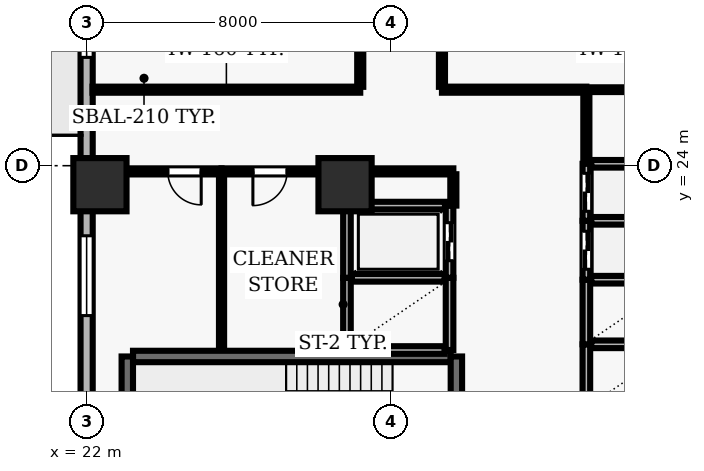
"""IFC4 building model, lengths in metres.
Left out: names, types, materials, properties, quantities, classifications, styles, units other than length and angle.
Written with IfcOpenShell. Run it as: python <this file> out.ifc"""

import sys

from ifc_helpers import new_model, si_unit, direction, frame, frame_2d, origin, origin_2d, place, context, subcontext, project, spatial, rectangle, extrude, element, fill, save


model = new_model("IFC4")
c1 = context("Model", 3, precision=1e-05, world=origin(), true_north=direction((0.0, 1.0)))
c2 = subcontext(c1, "Body", "Model", "MODEL_VIEW")
j1 = project(units=[si_unit("LENGTHUNIT", "METRE"), si_unit("PLANEANGLEUNIT", "RADIAN")], contexts=[c1])
p1 = place(None, origin())
s1 = spatial("IfcSite", under=j1, at=p1, CompositionType="ELEMENT")
p2 = place(p1, origin())
s2 = spatial("IfcBuilding", under=s1, at=p2, CompositionType="ELEMENT")
p3 = place(p2, frame((0.0, 0.0, 66.1)))
s3 = spatial("IfcBuildingStorey", under=s2, at=p3, CompositionType="ELEMENT", Elevation=66.1)
for number, where, z_axis, x_axis in (
    (1, (22.35, 23.5, 0.0), (0.0, 0.0, 1.0), (1.0, 0.0, 0.0)),
    (2, (28.8, 23.5, 0.0), (0.0, 0.0, 1.0), (1.0, 0.0, 0.0)),
):
    element("IfcColumn", number, at=place(p3, frame(where, z_axis=z_axis, x_axis=x_axis)), inside=s3, PredefinedType="COLUMN", context=c2, shape_type="SweptSolid", body=[
        extrude(rectangle(XDim=1.4, YDim=1.4, at=origin_2d()), origin(), (0.0, 0.0, 1.0), 3.9),
    ])
p4 = place(p3, frame((22.0, 51.5, 0.0), z_axis=(0.0, 0.0, 1.0), x_axis=(0.0, -1.0, 0.0)))
e3 = element("IfcWall", 3, at=p4, inside=s3, PredefinedType="SOLIDWALL", context=c2, shape_type="SweptSolid", body=[
    extrude(rectangle(XDim=49.0, YDim=0.32, at=frame_2d((24.5, 0.0))), origin(), (0.0, 0.0, 1.0), 3.69),
])
p5 = place(p4, frame((12.1, 0.0, 0.0)))
e4 = element("IfcOpeningElement", 4, at=p5, cuts=e3, PredefinedType="OPENING", context=c2, shape_type="SweptSolid", body=[
    extrude(rectangle(XDim=1.0, YDim=2.2, at=frame_2d((0.5, 1.1))), frame((0.0, 0.17, 0.0), z_axis=(0.0, -1.0, 0.0), x_axis=(1.0, 0.0, 0.0)), (0.0, 0.0, 1.0), 0.34),
])
p6 = place(p4, frame((1.672, 0.0, 0.9)))
e5 = element("IfcOpeningElement", 5, at=p6, cuts=e3, PredefinedType="OPENING", context=c2, shape_type="SweptSolid", body=[
    extrude(rectangle(XDim=2.1, YDim=1.6, at=frame_2d((1.05, 0.8))), frame((0.0, 0.17, 0.0), z_axis=(0.0, -1.0, 0.0), x_axis=(1.0, 0.0, 0.0)), (0.0, 0.0, 1.0), 0.34),
])
p7 = place(p4, frame((7.117, 0.0, 0.9)))
e6 = element("IfcOpeningElement", 6, at=p7, cuts=e3, PredefinedType="OPENING", context=c2, shape_type="SweptSolid", body=[
    extrude(rectangle(XDim=2.1, YDim=1.6, at=frame_2d((1.05, 0.8))), frame((0.0, 0.17, 0.0), z_axis=(0.0, -1.0, 0.0), x_axis=(1.0, 0.0, 0.0)), (0.0, 0.0, 1.0), 0.34),
])
p8 = place(p4, frame((18.006, 0.0, 0.9)))
e7 = element("IfcOpeningElement", 7, at=p8, cuts=e3, PredefinedType="OPENING", context=c2, shape_type="SweptSolid", body=[
    extrude(rectangle(XDim=2.1, YDim=1.6, at=frame_2d((1.05, 0.8))), frame((0.0, 0.17, 0.0), z_axis=(0.0, -1.0, 0.0), x_axis=(1.0, 0.0, 0.0)), (0.0, 0.0, 1.0), 0.34),
])
p9 = place(p4, frame((22.55, 0.0, 0.9)))
e8 = element("IfcOpeningElement", 8, at=p9, cuts=e3, PredefinedType="OPENING", context=c2, shape_type="SweptSolid", body=[
    extrude(rectangle(XDim=2.1, YDim=1.6, at=frame_2d((1.05, 0.8))), frame((0.0, 0.17, 0.0), z_axis=(0.0, -1.0, 0.0), x_axis=(1.0, 0.0, 0.0)), (0.0, 0.0, 1.0), 0.34),
])
p10 = place(p4, frame((29.344, 0.0, 0.9)))
e9 = element("IfcOpeningElement", 9, at=p10, cuts=e3, PredefinedType="OPENING", context=c2, shape_type="SweptSolid", body=[
    extrude(rectangle(XDim=2.1, YDim=1.6, at=frame_2d((1.05, 0.8))), frame((0.0, 0.17, 0.0), z_axis=(0.0, -1.0, 0.0), x_axis=(1.0, 0.0, 0.0)), (0.0, 0.0, 1.0), 0.34),
])
p11 = place(p4, frame((33.889, 0.0, 0.9)))
e10 = element("IfcOpeningElement", 10, at=p11, cuts=e3, PredefinedType="OPENING", context=c2, shape_type="SweptSolid", body=[
    extrude(rectangle(XDim=2.1, YDim=1.6, at=frame_2d((1.05, 0.8))), frame((0.0, 0.17, 0.0), z_axis=(0.0, -1.0, 0.0), x_axis=(1.0, 0.0, 0.0)), (0.0, 0.0, 1.0), 0.34),
])
p12 = place(p4, frame((39.783, 0.0, 0.9)))
e11 = element("IfcOpeningElement", 11, at=p12, cuts=e3, PredefinedType="OPENING", context=c2, shape_type="SweptSolid", body=[
    extrude(rectangle(XDim=2.1, YDim=1.6, at=frame_2d((1.05, 0.8))), frame((0.0, 0.17, 0.0), z_axis=(0.0, -1.0, 0.0), x_axis=(1.0, 0.0, 0.0)), (0.0, 0.0, 1.0), 0.34),
])
p13 = place(p3, frame((31.58, 18.98, 0.0), z_axis=(0.0, 0.0, 1.0), x_axis=(-1.0, 0.0, 0.0)))
e12 = element("IfcWall", 12, at=p13, inside=s3, PredefinedType="SHEAR", context=c2, shape_type="SweptSolid", body=[
    extrude(rectangle(XDim=8.36, YDim=0.3, at=frame_2d((4.18, 0.0))), origin(), (0.0, 0.0, 1.0), 3.69),
])
p14 = place(p3, frame((23.07, 18.98, 0.0), z_axis=(0.0, 0.0, 1.0), x_axis=(0.0, -1.0, 0.0)))
e13 = element("IfcWall", 13, at=p14, inside=s3, PredefinedType="SHEAR", context=c2, shape_type="SweptSolid", body=[
    extrude(rectangle(XDim=3.51, YDim=0.3, at=frame_2d((1.755, 0.0))), origin(), (0.0, 0.0, 1.0), 3.69),
])
p15 = place(p3, frame((31.73, 15.47, 0.0), z_axis=(0.0, 0.0, 1.0), x_axis=(0.0, 1.0, 0.0)))
e14 = element("IfcWall", 14, at=p15, inside=s3, PredefinedType="SHEAR", context=c2, shape_type="SweptSolid", body=[
    extrude(rectangle(XDim=3.51, YDim=0.3, at=frame_2d((1.755, 0.0))), origin(), (0.0, 0.0, 1.0), 3.69),
])
p16 = place(p15, frame((1.18, 0.0, 0.0)))
e15 = element("IfcOpeningElement", 15, at=p16, cuts=e14, PredefinedType="OPENING", context=c2, shape_type="SweptSolid", body=[
    extrude(rectangle(XDim=1.15, YDim=2.15, at=frame_2d((0.575, 1.075))), frame((0.0, 0.16, 0.0), z_axis=(0.0, -1.0, 0.0), x_axis=(1.0, 0.0, 0.0)), (0.0, 0.0, 1.0), 0.32),
])
p17 = place(p3, frame((35.15, 19.3, 0.0), z_axis=(0.0, 0.0, 1.0), x_axis=(0.0, -1.0, 0.0)))
e16 = element("IfcWall", 16, at=p17, inside=s3, PredefinedType="SOLIDWALL", context=c2, shape_type="SweptSolid", body=[
    extrude(rectangle(XDim=1.7, YDim=0.2, at=frame_2d((0.85, 0.0))), origin(), (0.0, 0.0, 1.0), 3.69),
])
p18 = place(p3, frame((37.42, 19.3, 0.0), z_axis=(0.0, 0.0, 1.0), x_axis=(-1.0, 0.0, 0.0)))
e17 = element("IfcWall", 17, at=p18, inside=s3, PredefinedType="SOLIDWALL", context=c2, shape_type="SweptSolid", body=[
    extrude(rectangle(XDim=2.14, YDim=0.2, at=frame_2d((1.07, 0.0))), origin(), (0.0, 0.0, 1.0), 3.69),
])
p19 = place(p3, frame((35.15, 21.0, 0.0), z_axis=(0.0, 0.0, 1.0), x_axis=(0.0, -1.0, 0.0)))
e18 = element("IfcWall", 18, at=p19, inside=s3, PredefinedType="SOLIDWALL", context=c2, shape_type="SweptSolid", body=[
    extrude(rectangle(XDim=1.7, YDim=0.2, at=frame_2d((0.85, 0.0))), origin(), (0.0, 0.0, 1.0), 3.69),
])
p20 = place(p3, frame((37.42, 21.0, 0.0), z_axis=(0.0, 0.0, 1.0), x_axis=(-1.0, 0.0, 0.0)))
e19 = element("IfcWall", 19, at=p20, inside=s3, PredefinedType="SOLIDWALL", context=c2, shape_type="SweptSolid", body=[
    extrude(rectangle(XDim=2.14, YDim=0.2, at=frame_2d((1.07, 0.0))), origin(), (0.0, 0.0, 1.0), 3.69),
])
for number, where, z_axis, x_axis in (
    (20, (28.85, 21.05, 0.0), (0.0, 0.0, 1.0), (0.0, -1.0, 0.0)),
    (21, (31.55, 19.15, 0.0), (0.0, 0.0, 1.0), (0.0, 1.0, 0.0)),
):
    element("IfcWall", number, at=place(p3, frame(where, z_axis=z_axis, x_axis=x_axis)), inside=s3, PredefinedType="SOLIDWALL", context=c2, shape_type="SweptSolid", body=[
        extrude(rectangle(XDim=1.9, YDim=0.2, at=frame_2d((0.95, 0.0))), origin(), (0.0, 0.0, 1.0), 3.69),
    ])
for number, where, z_axis, x_axis in (
    (22, (28.98, 19.15, 0.0), (0.0, 0.0, 1.0), (1.0, 0.0, 0.0)),
    (23, (31.42, 21.05, 0.0), (0.0, 0.0, 1.0), (-1.0, 0.0, 0.0)),
):
    element("IfcWall", number, at=place(p3, frame(where, z_axis=z_axis, x_axis=x_axis)), inside=s3, PredefinedType="SOLIDWALL", context=c2, shape_type="SweptSolid", body=[
        extrude(rectangle(XDim=2.44, YDim=0.2, at=frame_2d((1.22, 0.0))), origin(), (0.0, 0.0, 1.0), 3.69),
    ])
p21 = place(p3, frame((35.15, 22.55, 0.0), z_axis=(0.0, 0.0, 1.0), x_axis=(0.0, -1.0, 0.0)))
e24 = element("IfcWall", 24, at=p21, inside=s3, PredefinedType="SOLIDWALL", context=c2, shape_type="SweptSolid", body=[
    extrude(rectangle(XDim=1.55, YDim=0.2, at=frame_2d((0.775, 0.0))), origin(), (0.0, 0.0, 1.0), 3.69),
])
p22 = place(p21, frame((0.275, 0.0, 0.0)))
e25 = element("IfcOpeningElement", 25, at=p22, cuts=e24, PredefinedType="OPENING", context=c2, shape_type="SweptSolid", body=[
    extrude(rectangle(XDim=1.0, YDim=2.1, at=frame_2d((0.5, 1.05))), frame((0.0, 0.11, 0.0), z_axis=(0.0, -1.0, 0.0), x_axis=(1.0, 0.0, 0.0)), (0.0, 0.0, 1.0), 0.22),
])
p23 = place(p3, frame((37.42, 22.55, 0.0), z_axis=(0.0, 0.0, 1.0), x_axis=(-1.0, 0.0, 0.0)))
e26 = element("IfcWall", 26, at=p23, inside=s3, PredefinedType="SOLIDWALL", context=c2, shape_type="SweptSolid", body=[
    extrude(rectangle(XDim=2.14, YDim=0.2, at=frame_2d((1.07, 0.0))), origin(), (0.0, 0.0, 1.0), 3.69),
])
p24 = place(p3, frame((35.15, 24.05, 0.0), z_axis=(0.0, 0.0, 1.0), x_axis=(0.0, -1.0, 0.0)))
e27 = element("IfcWall", 27, at=p24, inside=s3, PredefinedType="SOLIDWALL", context=c2, shape_type="SweptSolid", body=[
    extrude(rectangle(XDim=1.5, YDim=0.2, at=frame_2d((0.75, 0.0))), origin(), (0.0, 0.0, 1.0), 3.69),
])
p25 = place(p24, frame((0.25, 0.0, 0.0)))
e28 = element("IfcOpeningElement", 28, at=p25, cuts=e27, PredefinedType="OPENING", context=c2, shape_type="SweptSolid", body=[
    extrude(rectangle(XDim=1.0, YDim=2.1, at=frame_2d((0.5, 1.05))), frame((0.0, 0.11, 0.0), z_axis=(0.0, -1.0, 0.0), x_axis=(1.0, 0.0, 0.0)), (0.0, 0.0, 1.0), 0.22),
])
p26 = place(p3, frame((37.42, 24.05, 0.0), z_axis=(0.0, 0.0, 1.0), x_axis=(-1.0, 0.0, 0.0)))
e29 = element("IfcWall", 29, at=p26, inside=s3, PredefinedType="SOLIDWALL", context=c2, shape_type="SweptSolid", body=[
    extrude(rectangle(XDim=2.14, YDim=0.2, at=frame_2d((1.07, 0.0))), origin(), (0.0, 0.0, 1.0), 3.69),
])
p27 = place(p3, frame((28.85, 22.95, 0.0), z_axis=(0.0, 0.0, 1.0), x_axis=(0.0, -1.0, 0.0)))
e30 = element("IfcWall", 30, at=p27, inside=s3, PredefinedType="SOLIDWALL", context=c2, shape_type="SweptSolid", body=[
    extrude(rectangle(XDim=1.9, YDim=0.2, at=frame_2d((0.95, 0.0))), origin(), (0.0, 0.0, 1.0), 3.69),
])
p28 = place(p3, frame((31.55, 21.05, 0.0), z_axis=(0.0, 0.0, 1.0), x_axis=(0.0, 1.0, 0.0)))
e31 = element("IfcWall", 31, at=p28, inside=s3, PredefinedType="SOLIDWALL", context=c2, shape_type="SweptSolid", body=[
    extrude(rectangle(XDim=1.9, YDim=0.2, at=frame_2d((0.95, 0.0))), origin(), (0.0, 0.0, 1.0), 3.69),
])
p29 = place(p28, frame((0.45, 0.0, 0.0)))
e32 = element("IfcOpeningElement", 32, at=p29, cuts=e31, PredefinedType="OPENING", context=c2, shape_type="SweptSolid", body=[
    extrude(rectangle(XDim=1.0, YDim=2.1, at=frame_2d((0.5, 1.05))), frame((0.0, 0.11, 0.0), z_axis=(0.0, -1.0, 0.0), x_axis=(1.0, 0.0, 0.0)), (0.0, 0.0, 1.0), 0.22),
])
p30 = place(p3, frame((31.43, 22.95, 0.0), z_axis=(0.0, 0.0, 1.0), x_axis=(-1.0, 0.0, 0.0)))
e33 = element("IfcWall", 33, at=p30, inside=s3, PredefinedType="SOLIDWALL", context=c2, shape_type="SweptSolid", body=[
    extrude(rectangle(XDim=2.46, YDim=0.2, at=frame_2d((1.23, 0.0))), origin(), (0.0, 0.0, 1.0), 3.69),
])
p31 = place(p3, frame((25.55, 23.85, 0.0), z_axis=(0.0, 0.0, 1.0), x_axis=(-1.0, 0.0, 0.0)))
e34 = element("IfcWall", 34, at=p31, inside=s3, PredefinedType="PARTITIONING", context=c2, shape_type="SweptSolid", body=[
    extrude(rectangle(XDim=3.35, YDim=0.16, at=frame_2d((1.675, 0.0))), origin(), (0.0, 0.0, 1.0), 3.055),
])
p32 = place(p31, frame((0.535, 0.0, 0.0)))
e35 = element("IfcOpeningElement", 35, at=p32, cuts=e34, PredefinedType="OPENING", context=c2, shape_type="SweptSolid", body=[
    extrude(rectangle(XDim=0.88, YDim=2.1, at=frame_2d((0.44, 1.05))), frame((0.0, 0.09, 0.0), z_axis=(0.0, -1.0, 0.0), x_axis=(1.0, 0.0, 0.0)), (0.0, 0.0, 1.0), 0.18),
])
p33 = place(p3, frame((28.8, 23.85, 0.0), z_axis=(0.0, 0.0, 1.0), x_axis=(-1.0, 0.0, 0.0)))
e36 = element("IfcWall", 36, at=p33, inside=s3, PredefinedType="PARTITIONING", context=c2, shape_type="SweptSolid", body=[
    extrude(rectangle(XDim=3.25, YDim=0.16, at=frame_2d((1.625, 0.0))), origin(), (0.0, 0.0, 1.0), 3.055),
])
p34 = place(p33, frame((1.525, 0.0, 0.0)))
e37 = element("IfcOpeningElement", 37, at=p34, cuts=e36, PredefinedType="OPENING", context=c2, shape_type="SweptSolid", body=[
    extrude(rectangle(XDim=0.9, YDim=2.1, at=frame_2d((0.45, 1.05))), frame((0.0, 0.09, 0.0), z_axis=(0.0, -1.0, 0.0), x_axis=(1.0, 0.0, 0.0)), (0.0, 0.0, 1.0), 0.18),
])
p35 = place(p3, frame((28.8, 23.85, 0.0), z_axis=(0.0, 0.0, 1.0), x_axis=(1.0, 0.0, 0.0)))
e38 = element("IfcWall", 38, at=p35, inside=s3, PredefinedType="PARTITIONING", context=c2, shape_type="SweptSolid", body=[
    extrude(rectangle(XDim=2.85, YDim=0.16, at=frame_2d((1.425, 0.0))), origin(), (0.0, 0.0, 1.0), 3.69),
])
p36 = place(p3, frame((29.2, 26.0, 0.0), z_axis=(0.0, 0.0, 1.0), x_axis=(-1.0, 0.0, 0.0)))
e39 = element("IfcWall", 39, at=p36, inside=s3, PredefinedType="PARTITIONING", context=c2, shape_type="SweptSolid", body=[
    extrude(rectangle(XDim=7.045, YDim=0.16, at=frame_2d((3.522, 0.0))), origin(), (0.0, 0.0, 1.0), 3.69),
])
p37 = place(p3, frame((35.15, 26.0, 0.0), z_axis=(0.0, 0.0, 1.0), x_axis=(-1.0, 0.0, 0.0)))
e40 = element("IfcWall", 40, at=p37, inside=s3, PredefinedType="PARTITIONING", context=c2, shape_type="SweptSolid", body=[
    extrude(rectangle(XDim=3.8, YDim=0.16, at=frame_2d((1.9, 0.0))), origin(), (0.0, 0.0, 1.0), 3.69),
])
p38 = place(p3, frame((35.15, 26.0, 0.0), z_axis=(0.0, 0.0, 1.0), x_axis=(1.0, 0.0, 0.0)))
e41 = element("IfcWall", 41, at=p38, inside=s3, PredefinedType="PARTITIONING", context=c2, shape_type="SweptSolid", body=[
    extrude(rectangle(XDim=2.7, YDim=0.125, at=frame_2d((1.35, 0.0))), origin(), (0.0, 0.0, 1.0), 3.69),
])
p39 = place(p3, frame((25.55, 19.16, 0.0), z_axis=(0.0, 0.0, 1.0), x_axis=(0.0, 1.0, 0.0)))
e42 = element("IfcWall", 42, at=p39, inside=s3, PredefinedType="PARTITIONING", context=c2, shape_type="SweptSolid", body=[
    extrude(rectangle(XDim=4.615, YDim=0.135, at=frame_2d((2.308, 0.0))), origin(), (0.0, 0.0, 1.0), 3.69),
])
p40 = place(p3, frame((28.8, 22.95, 0.0), z_axis=(0.0, 0.0, 1.0), x_axis=(0.0, 1.0, 0.0)))
e43 = element("IfcWall", 43, at=p40, inside=s3, PredefinedType="PARTITIONING", context=c2, shape_type="SweptSolid", body=[
    extrude(rectangle(XDim=0.825, YDim=0.125, at=frame_2d((0.413, 0.0))), origin(), (0.0, 0.0, 1.0), 3.69),
])
p41 = place(p3, frame((29.2, 41.115, 0.0), z_axis=(0.0, 0.0, 1.0), x_axis=(0.0, -1.0, 0.0)))
e44 = element("IfcWall", 44, at=p41, inside=s3, PredefinedType="PARTITIONING", context=c2, shape_type="SweptSolid", body=[
    extrude(rectangle(XDim=15.04, YDim=0.16, at=frame_2d((7.52, 0.0))), origin(), (0.0, 0.0, 1.0), 3.69),
])
p42 = place(p41, frame((7.07, 0.0, 0.0)))
e45 = element("IfcOpeningElement", 45, at=p42, cuts=e44, PredefinedType="OPENING", context=c2, shape_type="SweptSolid", body=[
    extrude(rectangle(XDim=0.9, YDim=2.1, at=frame_2d((0.45, 1.05))), frame((0.0, 0.09, 0.0), z_axis=(0.0, -1.0, 0.0), x_axis=(1.0, 0.0, 0.0)), (0.0, 0.0, 1.0), 0.18),
])
p43 = place(p3, frame((31.35, 26.075, 0.0), z_axis=(0.0, 0.0, 1.0), x_axis=(0.0, 1.0, 0.0)))
e46 = element("IfcWall", 46, at=p43, inside=s3, PredefinedType="PARTITIONING", context=c2, shape_type="SweptSolid", body=[
    extrude(rectangle(XDim=15.058, YDim=0.16, at=frame_2d((7.529, 0.0))), origin(), (0.0, 0.0, 1.0), 3.69),
])
p44 = place(p43, frame((7.029, 0.0, 0.0)))
e47 = element("IfcOpeningElement", 47, at=p44, cuts=e46, PredefinedType="OPENING", context=c2, shape_type="SweptSolid", body=[
    extrude(rectangle(XDim=1.0, YDim=2.1, at=frame_2d((0.5, 1.05))), frame((0.0, 0.09, 0.0), z_axis=(0.0, -1.0, 0.0), x_axis=(1.0, 0.0, 0.0)), (0.0, 0.0, 1.0), 0.18),
])
p45 = place(p3, frame((31.65, 23.775, 0.0), z_axis=(0.0, 0.0, 1.0), x_axis=(0.0, -1.0, 0.0)))
e48 = element("IfcWall", 48, at=p45, inside=s3, PredefinedType="PARTITIONING", context=c2, shape_type="SweptSolid", body=[
    extrude(rectangle(XDim=0.825, YDim=0.16, at=frame_2d((0.413, 0.0))), origin(), (0.0, 0.0, 1.0), 3.69),
])
p46 = place(p3, frame((35.15, 24.07, 0.0), z_axis=(0.0, 0.0, 1.0), x_axis=(0.0, 1.0, 0.0)))
e49 = element("IfcWall", 49, at=p46, inside=s3, PredefinedType="PARTITIONING", context=c2, shape_type="SweptSolid", body=[
    extrude(rectangle(XDim=1.855, YDim=0.16, at=frame_2d((0.927, 0.0))), origin(), (0.0, 0.0, 1.0), 3.69),
])
p47 = place(p9, origin())
e50 = element("IfcWindow", 50, at=p47, inside=s3, PartitioningType="SINGLE_PANEL", PredefinedType="WINDOW", context=c2, shape_type="SweptSolid", body=[
    extrude(rectangle(XDim=2.1, YDim=1.6, at=frame_2d((1.05, 0.8))), frame((0.0, 0.03, 0.0), z_axis=(0.0, -1.0, 0.0), x_axis=(1.0, 0.0, 0.0)), (0.0, 0.0, 1.0), 0.06),
])
fill(e8, e50)
p48 = place(p10, origin())
e51 = element("IfcWindow", 51, at=p48, inside=s3, PartitioningType="SINGLE_PANEL", PredefinedType="WINDOW", context=c2, shape_type="SweptSolid", body=[
    extrude(rectangle(XDim=2.1, YDim=1.6, at=frame_2d((1.05, 0.8))), frame((0.0, 0.03, 0.0), z_axis=(0.0, -1.0, 0.0), x_axis=(1.0, 0.0, 0.0)), (0.0, 0.0, 1.0), 0.06),
])
fill(e9, e51)
p49 = place(p22, origin())
e52 = element("IfcDoor", 52, at=p49, inside=s3, OperationType="DOUBLE_DOOR_SLIDING", PredefinedType="DOOR", context=c2, shape_type="SweptSolid", body=[
    extrude(rectangle(XDim=1.0, YDim=2.1, at=frame_2d((0.5, 1.05))), frame((0.0, 0.025, 0.0), z_axis=(0.0, -1.0, 0.0), x_axis=(1.0, 0.0, 0.0)), (0.0, 0.0, 1.0), 0.05),
])
fill(e25, e52)
p50 = place(p25, origin())
e53 = element("IfcDoor", 53, at=p50, inside=s3, OperationType="DOUBLE_DOOR_SLIDING", PredefinedType="DOOR", context=c2, shape_type="SweptSolid", body=[
    extrude(rectangle(XDim=1.0, YDim=2.1, at=frame_2d((0.5, 1.05))), frame((0.0, 0.025, 0.0), z_axis=(0.0, -1.0, 0.0), x_axis=(1.0, 0.0, 0.0)), (0.0, 0.0, 1.0), 0.05),
])
fill(e28, e53)
p51 = place(p29, origin())
e54 = element("IfcDoor", 54, at=p51, inside=s3, OperationType="DOUBLE_DOOR_SLIDING", PredefinedType="DOOR", context=c2, shape_type="SweptSolid", body=[
    extrude(rectangle(XDim=1.0, YDim=2.1, at=frame_2d((0.5, 1.05))), frame((0.0, 0.025, 0.0), z_axis=(0.0, -1.0, 0.0), x_axis=(1.0, 0.0, 0.0)), (0.0, 0.0, 1.0), 0.05),
])
fill(e32, e54)
p52 = place(p32, origin())
e55 = element("IfcDoor", 55, at=p52, inside=s3, OperationType="SINGLE_SWING_LEFT", PredefinedType="DOOR", context=c2, shape_type="SweptSolid", body=[
    extrude(rectangle(XDim=0.88, YDim=2.1, at=frame_2d((0.44, 1.05))), frame((0.0, 0.025, 0.0), z_axis=(0.0, -1.0, 0.0), x_axis=(1.0, 0.0, 0.0)), (0.0, 0.0, 1.0), 0.05),
])
fill(e35, e55)
p53 = place(p34, origin())
e56 = element("IfcDoor", 56, at=p53, inside=s3, OperationType="SINGLE_SWING_RIGHT", PredefinedType="DOOR", context=c2, shape_type="SweptSolid", body=[
    extrude(rectangle(XDim=0.9, YDim=2.1, at=frame_2d((0.45, 1.05))), frame((0.0, 0.025, 0.0), z_axis=(0.0, -1.0, 0.0), x_axis=(1.0, 0.0, 0.0)), (0.0, 0.0, 1.0), 0.05),
])
fill(e37, e56)
save(model, sys.argv[1])
